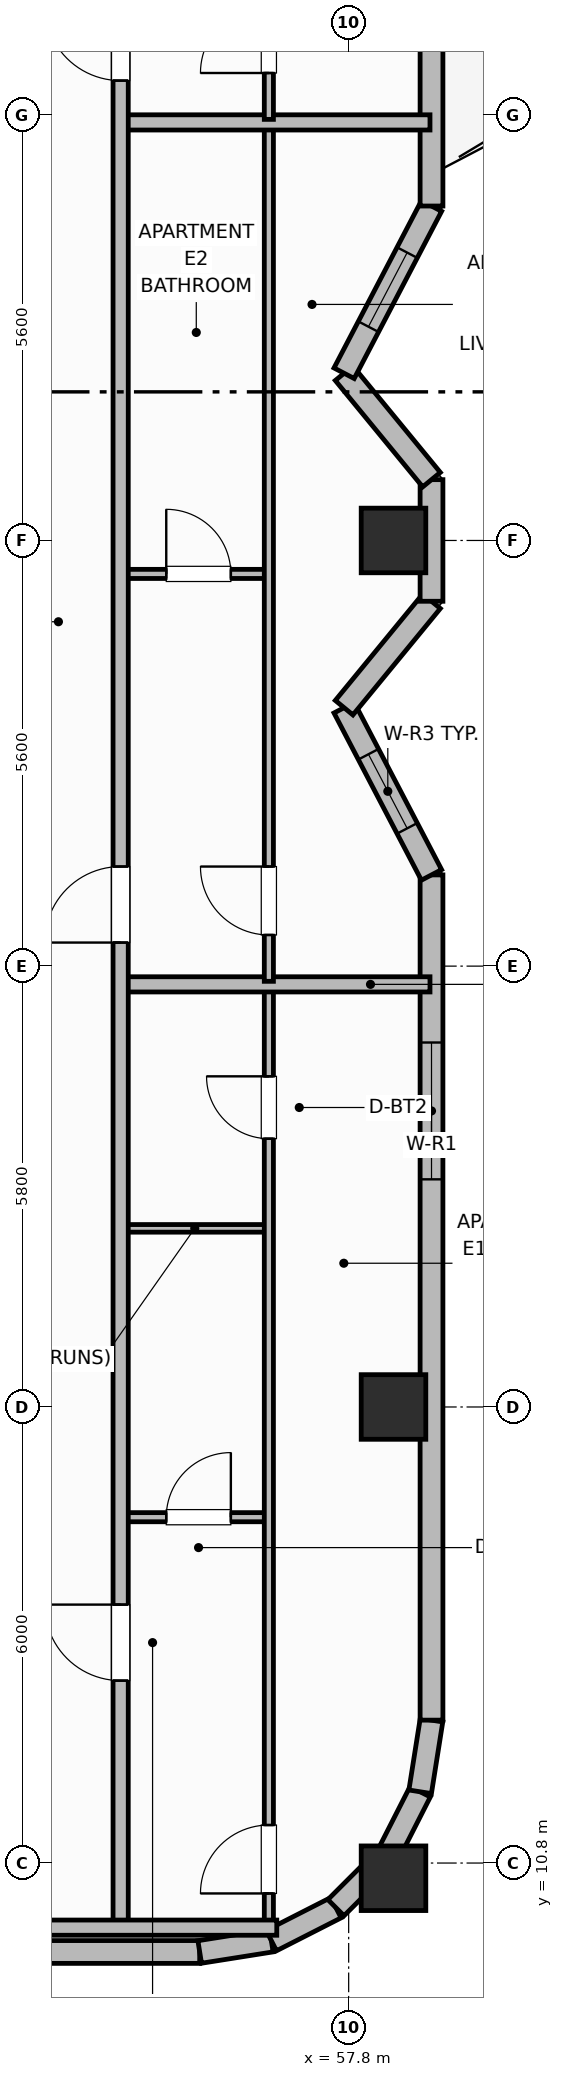
"""IFC4 building model, lengths in metres.
Left out: names, types, materials, properties, quantities, classifications, styles, units other than length and angle.
Written with IfcOpenShell. Run it as: python <this file> out.ifc"""

import sys

from ifc_helpers import new_model, si_unit, direction, frame, frame_2d, origin, origin_2d, place, context, subcontext, project, spatial, rectangle, extrude, element, fill, save


model = new_model("IFC4")
c1 = context("Model", 3, precision=1e-05, world=origin(), true_north=direction((0.0, 1.0)))
c2 = subcontext(c1, "Body", "Model", "MODEL_VIEW")
j1 = project(units=[si_unit("LENGTHUNIT", "METRE"), si_unit("PLANEANGLEUNIT", "RADIAN")], contexts=[c1])
p1 = place(None, origin())
s1 = spatial("IfcSite", under=j1, at=p1, CompositionType="ELEMENT")
p2 = place(p1, origin())
s2 = spatial("IfcBuilding", under=s1, at=p2, CompositionType="ELEMENT")
p3 = place(p2, frame((0.0, 0.0, 236.9)))
s3 = spatial("IfcBuildingStorey", under=s2, at=p3, CompositionType="ELEMENT", Elevation=236.9)
for number, where, z_axis, x_axis in (
    (1, (58.39, 10.6, 0.0), (0.0, 0.0, 1.0), (1.0, 0.0, 0.0)),
    (2, (58.39, 16.8, 0.0), (0.0, 0.0, 1.0), (1.0, 0.0, 0.0)),
    (3, (58.39, 28.2, 0.0), (0.0, 0.0, 1.0), (1.0, 0.0, 0.0)),
):
    element("IfcColumn", number, at=place(p3, frame(where, z_axis=z_axis, x_axis=x_axis)), inside=s3, PredefinedType="COLUMN", context=c2, shape_type="SweptSolid", body=[
        extrude(rectangle(XDim=0.85, YDim=0.85, at=origin_2d()), origin(), (0.0, 0.0, 1.0), 3.7),
    ])
p4 = place(p3, frame((30.61, 9.63, 0.0), z_axis=(0.0, 0.0, 1.0), x_axis=(1.0, 0.0, 0.0)))
e4 = element("IfcWall", 4, at=p4, inside=s3, PredefinedType="SOLIDWALL", context=c2, shape_type="SweptSolid", body=[
    extrude(rectangle(XDim=25.23, YDim=0.3, at=frame_2d((12.615, 0.0))), origin(), (0.0, 0.0, 1.0), 2.73),
])
p5 = place(p4, frame((0.894, 0.0, 0.71)))
e5 = element("IfcOpeningElement", 5, at=p5, cuts=e4, PredefinedType="OPENING", context=c2, shape_type="SweptSolid", body=[
    extrude(rectangle(XDim=2.1, YDim=1.9, at=frame_2d((1.05, 0.95))), frame((0.0, 0.16, 0.0), z_axis=(0.0, -1.0, 0.0), x_axis=(1.0, 0.0, 0.0)), (0.0, 0.0, 1.0), 0.32),
])
p6 = place(p4, frame((5.933, 0.0, 0.71)))
e6 = element("IfcOpeningElement", 6, at=p6, cuts=e4, PredefinedType="OPENING", context=c2, shape_type="SweptSolid", body=[
    extrude(rectangle(XDim=2.1, YDim=1.9, at=frame_2d((1.05, 0.95))), frame((0.0, 0.16, 0.0), z_axis=(0.0, -1.0, 0.0), x_axis=(1.0, 0.0, 0.0)), (0.0, 0.0, 1.0), 0.32),
])
p7 = place(p4, frame((9.221, 0.0, 0.71)))
e7 = element("IfcOpeningElement", 7, at=p7, cuts=e4, PredefinedType="OPENING", context=c2, shape_type="SweptSolid", body=[
    extrude(rectangle(XDim=2.1, YDim=1.9, at=frame_2d((1.05, 0.95))), frame((0.0, 0.16, 0.0), z_axis=(0.0, -1.0, 0.0), x_axis=(1.0, 0.0, 0.0)), (0.0, 0.0, 1.0), 0.32),
])
p8 = place(p4, frame((13.909, 0.0, 0.71)))
e8 = element("IfcOpeningElement", 8, at=p8, cuts=e4, PredefinedType="OPENING", context=c2, shape_type="SweptSolid", body=[
    extrude(rectangle(XDim=2.1, YDim=1.9, at=frame_2d((1.05, 0.95))), frame((0.0, 0.16, 0.0), z_axis=(0.0, -1.0, 0.0), x_axis=(1.0, 0.0, 0.0)), (0.0, 0.0, 1.0), 0.32),
])
p9 = place(p4, frame((17.548, 0.0, 0.71)))
e9 = element("IfcOpeningElement", 9, at=p9, cuts=e4, PredefinedType="OPENING", context=c2, shape_type="SweptSolid", body=[
    extrude(rectangle(XDim=2.1, YDim=1.9, at=frame_2d((1.05, 0.95))), frame((0.0, 0.16, 0.0), z_axis=(0.0, -1.0, 0.0), x_axis=(1.0, 0.0, 0.0)), (0.0, 0.0, 1.0), 0.32),
])
p10 = place(p3, frame((55.84, 9.63, 0.0), z_axis=(0.0, 0.0, 1.0), x_axis=(0.987663181641, 0.156593229835, 0.0)))
e10 = element("IfcWall", 10, at=p10, inside=s3, PredefinedType="SOLIDWALL", context=c2, shape_type="SweptSolid", body=[
    extrude(rectangle(XDim=0.954, YDim=0.3, at=frame_2d((0.477, 0.0))), origin(), (0.0, 0.0, 1.0), 2.73),
])
for number, where, z_axis, x_axis in (
    (11, (56.782, 9.779, 0.0), (0.0, 0.0, 1.0), (0.891, 0.454, 0.0)),
    (12, (57.633, 10.212, 0.0), (0.0, 0.0, 1.0), (0.707, 0.707, 0.0)),
    (13, (58.308, 10.887, 0.0), (0.0, 0.0, 1.0), (0.454, 0.891, 0.0)),
):
    element("IfcWall", number, at=place(p3, frame(where, z_axis=z_axis, x_axis=x_axis)), inside=s3, PredefinedType="SOLIDWALL", context=c2, shape_type="SweptSolid", body=[
        extrude(rectangle(XDim=0.954, YDim=0.3, at=frame_2d((0.477, 0.0))), origin(), (0.0, 0.0, 1.0), 2.73),
    ])
p11 = place(p3, frame((58.741, 11.738, 0.0), z_axis=(0.0, 0.0, 1.0), x_axis=(0.156343617883, 0.987702725088, 0.0)))
e14 = element("IfcWall", 14, at=p11, inside=s3, PredefinedType="SOLIDWALL", context=c2, shape_type="SweptSolid", body=[
    extrude(rectangle(XDim=0.954, YDim=0.3, at=frame_2d((0.477, 0.0))), origin(), (0.0, 0.0, 1.0), 2.73),
])
p12 = place(p3, frame((58.89, 12.68, 0.0), z_axis=(0.0, 0.0, 1.0), x_axis=(0.0, 1.0, 0.0)))
e15 = element("IfcWall", 15, at=p12, inside=s3, PredefinedType="SOLIDWALL", context=c2, shape_type="SweptSolid", body=[
    extrude(rectangle(XDim=11.12, YDim=0.3, at=frame_2d((5.56, 0.0))), origin(), (0.0, 0.0, 1.0), 2.73),
])
p13 = place(p12, frame((7.115, 0.0, 0.76)))
e16 = element("IfcOpeningElement", 16, at=p13, cuts=e15, PredefinedType="OPENING", context=c2, shape_type="SweptSolid", body=[
    extrude(rectangle(XDim=1.8, YDim=1.85, at=frame_2d((0.9, 0.925))), frame((0.0, 0.16, 0.0), z_axis=(0.0, -1.0, 0.0), x_axis=(1.0, 0.0, 0.0)), (0.0, 0.0, 1.0), 0.32),
])
p14 = place(p3, frame((58.89, 23.8, 0.0), z_axis=(0.0, 0.0, 1.0), x_axis=(-0.46323138706, 0.886237373418, 0.0)))
e17 = element("IfcWall", 17, at=p14, inside=s3, PredefinedType="SOLIDWALL", context=c2, shape_type="SweptSolid", body=[
    extrude(rectangle(XDim=2.482, YDim=0.3, at=frame_2d((1.241, 0.0))), origin(), (0.0, 0.0, 1.0), 2.73),
])
p15 = place(p14, frame((0.691, 0.0, 0.92)))
e18 = element("IfcOpeningElement", 18, at=p15, cuts=e17, PredefinedType="OPENING", context=c2, shape_type="SweptSolid", body=[
    extrude(rectangle(XDim=1.1, YDim=1.65, at=frame_2d((0.55, 0.825))), frame((0.0, 0.16, 0.0), z_axis=(0.0, -1.0, 0.0), x_axis=(1.0, 0.0, 0.0)), (0.0, 0.0, 1.0), 0.32),
])
p16 = place(p3, frame((57.74, 26.0, 0.0), z_axis=(0.0, 0.0, 1.0), x_axis=(0.634733675645, 0.772730975827, 0.0)))
e19 = element("IfcWall", 19, at=p16, inside=s3, PredefinedType="SOLIDWALL", context=c2, shape_type="SweptSolid", body=[
    extrude(rectangle(XDim=1.812, YDim=0.3, at=frame_2d((0.906, 0.0))), origin(), (0.0, 0.0, 1.0), 2.73),
])
p17 = place(p3, frame((58.89, 27.4, 0.0), z_axis=(0.0, 0.0, 1.0), x_axis=(0.0, 1.0, 0.0)))
e20 = element("IfcWall", 20, at=p17, inside=s3, PredefinedType="SOLIDWALL", context=c2, shape_type="SweptSolid", body=[
    extrude(rectangle(XDim=1.6, YDim=0.3, at=frame_2d((0.8, 0.0))), origin(), (0.0, 0.0, 1.0), 2.73),
])
p18 = place(p3, frame((58.89, 29.0, 0.0), z_axis=(0.0, 0.0, 1.0), x_axis=(-0.634733675645, 0.772730975827, 0.0)))
e21 = element("IfcWall", 21, at=p18, inside=s3, PredefinedType="SOLIDWALL", context=c2, shape_type="SweptSolid", body=[
    extrude(rectangle(XDim=1.812, YDim=0.3, at=frame_2d((0.906, 0.0))), origin(), (0.0, 0.0, 1.0), 2.73),
])
p19 = place(p3, frame((57.74, 30.4, 0.0), z_axis=(0.0, 0.0, 1.0), x_axis=(0.463191013929, 0.88625847506, 0.0)))
e22 = element("IfcWall", 22, at=p19, inside=s3, PredefinedType="SOLIDWALL", context=c2, shape_type="SweptSolid", body=[
    extrude(rectangle(XDim=2.483, YDim=0.3, at=frame_2d((1.241, 0.0))), origin(), (0.0, 0.0, 1.0), 2.73),
])
p20 = place(p19, frame((0.691, 0.0, 0.92)))
e23 = element("IfcOpeningElement", 23, at=p20, cuts=e22, PredefinedType="OPENING", context=c2, shape_type="SweptSolid", body=[
    extrude(rectangle(XDim=1.1, YDim=1.65, at=frame_2d((0.55, 0.825))), frame((0.0, 0.16, 0.0), z_axis=(0.0, -1.0, 0.0), x_axis=(1.0, 0.0, 0.0)), (0.0, 0.0, 1.0), 0.32),
])
p21 = place(p3, frame((58.89, 32.6, 0.0), z_axis=(0.0, 0.0, 1.0), x_axis=(0.0, 1.0, 0.0)))
e24 = element("IfcWall", 24, at=p21, inside=s3, PredefinedType="SOLIDWALL", context=c2, shape_type="SweptSolid", body=[
    extrude(rectangle(XDim=11.12, YDim=0.3, at=frame_2d((5.56, 0.0))), origin(), (0.0, 0.0, 1.0), 2.73),
])
p22 = place(p21, frame((2.1, 0.0, 0.0)))
e25 = element("IfcOpeningElement", 25, at=p22, cuts=e24, PredefinedType="OPENING", context=c2, shape_type="SweptSolid", body=[
    extrude(rectangle(XDim=1.6, YDim=2.1, at=frame_2d((0.8, 1.05))), frame((0.0, 0.16, 0.0), z_axis=(0.0, -1.0, 0.0), x_axis=(1.0, 0.0, 0.0)), (0.0, 0.0, 1.0), 0.32),
])
p23 = place(p21, frame((8.265, 0.0, 0.71)))
e26 = element("IfcOpeningElement", 26, at=p23, cuts=e24, PredefinedType="OPENING", context=c2, shape_type="SweptSolid", body=[
    extrude(rectangle(XDim=1.6, YDim=1.9, at=frame_2d((0.8, 0.95))), frame((0.0, 0.16, 0.0), z_axis=(0.0, -1.0, 0.0), x_axis=(1.0, 0.0, 0.0)), (0.0, 0.0, 1.0), 0.32),
])
p24 = place(p3, frame((54.8, 15.35, 0.0), z_axis=(0.0, 0.0, 1.0), x_axis=(1.0, 0.0, 0.0)))
e27 = element("IfcWall", 27, at=p24, inside=s3, PredefinedType="PARTITIONING", context=c2, shape_type="SweptSolid", body=[
    extrude(rectangle(XDim=1.95, YDim=0.12, at=frame_2d((0.975, 0.0))), origin(), (0.0, 0.0, 1.0), 2.56),
])
p25 = place(p24, frame((0.6, 0.0, 0.0)))
e28 = element("IfcOpeningElement", 28, at=p25, cuts=e27, PredefinedType="OPENING", context=c2, shape_type="SweptSolid", body=[
    extrude(rectangle(XDim=0.85, YDim=2.1, at=frame_2d((0.425, 1.05))), frame((0.0, 0.07, 0.0), z_axis=(0.0, -1.0, 0.0), x_axis=(1.0, 0.0, 0.0)), (0.0, 0.0, 1.0), 0.14),
])
p26 = place(p3, frame((54.8, 19.15, 0.0), z_axis=(0.0, 0.0, 1.0), x_axis=(1.0, 0.0, 0.0)))
e29 = element("IfcWall", 29, at=p26, inside=s3, PredefinedType="PARTITIONING", context=c2, shape_type="SweptSolid", body=[
    extrude(rectangle(XDim=1.95, YDim=0.1, at=frame_2d((0.975, 0.0))), origin(), (0.0, 0.0, 1.0), 2.56),
])
p27 = place(p3, frame((56.75, 9.99, 0.0), z_axis=(0.0, 0.0, 1.0), x_axis=(0.0, 1.0, 0.0)))
e30 = element("IfcWall", 30, at=p27, inside=s3, PredefinedType="PARTITIONING", context=c2, shape_type="SweptSolid", body=[
    extrude(rectangle(XDim=12.33, YDim=0.12, at=frame_2d((6.165, 0.0))), origin(), (0.0, 0.0, 1.0), 2.56),
])
p28 = place(p27, frame((0.41, 0.0, 0.0)))
e31 = element("IfcOpeningElement", 31, at=p28, cuts=e30, PredefinedType="OPENING", context=c2, shape_type="SweptSolid", body=[
    extrude(rectangle(XDim=0.9, YDim=2.1, at=frame_2d((0.45, 1.05))), frame((0.0, 0.07, 0.0), z_axis=(0.0, -1.0, 0.0), x_axis=(1.0, 0.0, 0.0)), (0.0, 0.0, 1.0), 0.14),
])
p29 = place(p27, frame((10.34, 0.0, 0.0)))
e32 = element("IfcOpeningElement", 32, at=p29, cuts=e30, PredefinedType="OPENING", context=c2, shape_type="SweptSolid", body=[
    extrude(rectangle(XDim=0.82, YDim=2.08, at=frame_2d((0.41, 1.04))), frame((0.0, 0.07, 0.0), z_axis=(0.0, -1.0, 0.0), x_axis=(1.0, 0.0, 0.0)), (0.0, 0.0, 1.0), 0.14),
])
p30 = place(p3, frame((54.8, 22.36, 0.0), z_axis=(0.0, 0.0, 1.0), x_axis=(1.0, 0.0, 0.0)))
e33 = element("IfcWall", 33, at=p30, inside=s3, PredefinedType="PARTITIONING", context=c2, shape_type="SweptSolid", body=[
    extrude(rectangle(XDim=4.07, YDim=0.2, at=frame_2d((2.035, 0.0))), origin(), (0.0, 0.0, 1.0), 2.56),
])
p31 = place(p3, frame((54.8, 27.76, 0.0), z_axis=(0.0, 0.0, 1.0), x_axis=(1.0, 0.0, 0.0)))
e34 = element("IfcWall", 34, at=p31, inside=s3, PredefinedType="PARTITIONING", context=c2, shape_type="SweptSolid", body=[
    extrude(rectangle(XDim=1.95, YDim=0.12, at=frame_2d((0.975, 0.0))), origin(), (0.0, 0.0, 1.0), 2.56),
])
p32 = place(p31, frame((0.6, 0.0, 0.0)))
e35 = element("IfcOpeningElement", 35, at=p32, cuts=e34, PredefinedType="OPENING", context=c2, shape_type="SweptSolid", body=[
    extrude(rectangle(XDim=0.85, YDim=2.1, at=frame_2d((0.425, 1.05))), frame((0.0, 0.07, 0.0), z_axis=(0.0, -1.0, 0.0), x_axis=(1.0, 0.0, 0.0)), (0.0, 0.0, 1.0), 0.14),
])
p33 = place(p3, frame((56.75, 22.4, 0.0), z_axis=(0.0, 0.0, 1.0), x_axis=(0.0, 1.0, 0.0)))
e36 = element("IfcWall", 36, at=p33, inside=s3, PredefinedType="PARTITIONING", context=c2, shape_type="SweptSolid", body=[
    extrude(rectangle(XDim=11.26, YDim=0.12, at=frame_2d((5.63, 0.0))), origin(), (0.0, 0.0, 1.0), 2.56),
])
p34 = place(p33, frame((0.61, 0.0, 0.0)))
e37 = element("IfcOpeningElement", 37, at=p34, cuts=e36, PredefinedType="OPENING", context=c2, shape_type="SweptSolid", body=[
    extrude(rectangle(XDim=0.9, YDim=2.1, at=frame_2d((0.45, 1.05))), frame((0.0, 0.07, 0.0), z_axis=(0.0, -1.0, 0.0), x_axis=(1.0, 0.0, 0.0)), (0.0, 0.0, 1.0), 0.14),
])
p35 = place(p3, frame((54.8, 33.7, 0.0), z_axis=(0.0, 0.0, 1.0), x_axis=(1.0, 0.0, 0.0)))
e38 = element("IfcWall", 38, at=p35, inside=s3, PredefinedType="PARTITIONING", context=c2, shape_type="SweptSolid", body=[
    extrude(rectangle(XDim=4.07, YDim=0.2, at=frame_2d((2.035, 0.0))), origin(), (0.0, 0.0, 1.0), 2.56),
])
p36 = place(p3, frame((56.75, 33.74, 0.0), z_axis=(0.0, 0.0, 1.0), x_axis=(0.0, 1.0, 0.0)))
e39 = element("IfcWall", 39, at=p36, inside=s3, PredefinedType="PARTITIONING", context=c2, shape_type="SweptSolid", body=[
    extrude(rectangle(XDim=12.67, YDim=0.12, at=frame_2d((6.335, 0.0))), origin(), (0.0, 0.0, 1.0), 2.56),
])
p37 = place(p36, frame((0.61, 0.0, 0.0)))
e40 = element("IfcOpeningElement", 40, at=p37, cuts=e39, PredefinedType="OPENING", context=c2, shape_type="SweptSolid", body=[
    extrude(rectangle(XDim=0.9, YDim=2.1, at=frame_2d((0.45, 1.05))), frame((0.0, 0.07, 0.0), z_axis=(0.0, -1.0, 0.0), x_axis=(1.0, 0.0, 0.0)), (0.0, 0.0, 1.0), 0.14),
])
p38 = place(p36, frame((10.51, 0.0, 0.0)))
e41 = element("IfcOpeningElement", 41, at=p38, cuts=e39, PredefinedType="OPENING", context=c2, shape_type="SweptSolid", body=[
    extrude(rectangle(XDim=0.82, YDim=2.08, at=frame_2d((0.41, 1.04))), frame((0.0, 0.07, 0.0), z_axis=(0.0, -1.0, 0.0), x_axis=(1.0, 0.0, 0.0)), (0.0, 0.0, 1.0), 0.14),
])
p39 = place(p3, frame((54.8, 9.95, 0.0), z_axis=(0.0, 0.0, 1.0), x_axis=(0.0, 1.0, 0.0)))
e42 = element("IfcWall", 42, at=p39, inside=s3, PredefinedType="PARTITIONING", context=c2, shape_type="SweptSolid", body=[
    extrude(rectangle(XDim=36.5, YDim=0.2, at=frame_2d((18.25, 0.0))), origin(), (0.0, 0.0, 1.0), 2.56),
])
p40 = place(p39, frame((3.25, 0.0, 0.0)))
e43 = element("IfcOpeningElement", 43, at=p40, cuts=e42, PredefinedType="OPENING", context=c2, shape_type="SweptSolid", body=[
    extrude(rectangle(XDim=1.0, YDim=2.15, at=frame_2d((0.5, 1.075))), frame((0.0, 0.11, 0.0), z_axis=(0.0, -1.0, 0.0), x_axis=(1.0, 0.0, 0.0)), (0.0, 0.0, 1.0), 0.22),
])
p41 = place(p39, frame((12.96, 0.0, 0.0)))
e44 = element("IfcOpeningElement", 44, at=p41, cuts=e42, PredefinedType="OPENING", context=c2, shape_type="SweptSolid", body=[
    extrude(rectangle(XDim=1.0, YDim=2.15, at=frame_2d((0.5, 1.075))), frame((0.0, 0.11, 0.0), z_axis=(0.0, -1.0, 0.0), x_axis=(1.0, 0.0, 0.0)), (0.0, 0.0, 1.0), 0.22),
])
p42 = place(p39, frame((24.3, 0.0, 0.0)))
e45 = element("IfcOpeningElement", 45, at=p42, cuts=e42, PredefinedType="OPENING", context=c2, shape_type="SweptSolid", body=[
    extrude(rectangle(XDim=1.0, YDim=2.15, at=frame_2d((0.5, 1.075))), frame((0.0, 0.11, 0.0), z_axis=(0.0, -1.0, 0.0), x_axis=(1.0, 0.0, 0.0)), (0.0, 0.0, 1.0), 0.22),
])
p43 = place(p3, frame((53.1, 9.95, 0.0), z_axis=(0.0, 0.0, 1.0), x_axis=(1.0, 0.0, 0.0)))
e46 = element("IfcWall", 46, at=p43, inside=s3, PredefinedType="PARTITIONING", context=c2, shape_type="SweptSolid", body=[
    extrude(rectangle(XDim=3.754, YDim=0.2, at=frame_2d((1.877, 0.0))), origin(), (0.0, 0.0, 1.0), 2.56),
])
p44 = place(p13, origin())
e47 = element("IfcWindow", 47, at=p44, inside=s3, PartitioningType="SINGLE_PANEL", PredefinedType="WINDOW", context=c2, shape_type="SweptSolid", body=[
    extrude(rectangle(XDim=1.8, YDim=1.85, at=frame_2d((0.9, 0.925))), frame((0.0, 0.03, 0.0), z_axis=(0.0, -1.0, 0.0), x_axis=(1.0, 0.0, 0.0)), (0.0, 0.0, 1.0), 0.06),
])
fill(e16, e47)
p45 = place(p15, origin())
e48 = element("IfcWindow", 48, at=p45, inside=s3, PartitioningType="SINGLE_PANEL", PredefinedType="WINDOW", context=c2, shape_type="SweptSolid", body=[
    extrude(rectangle(XDim=1.1, YDim=1.65, at=frame_2d((0.55, 0.825))), frame((0.0, 0.03, 0.0), z_axis=(0.0, -1.0, 0.0), x_axis=(1.0, 0.0, 0.0)), (0.0, 0.0, 1.0), 0.06),
])
fill(e18, e48)
p46 = place(p20, origin())
e49 = element("IfcWindow", 49, at=p46, inside=s3, PartitioningType="SINGLE_PANEL", PredefinedType="WINDOW", context=c2, shape_type="SweptSolid", body=[
    extrude(rectangle(XDim=1.1, YDim=1.65, at=frame_2d((0.55, 0.825))), frame((0.0, 0.03, 0.0), z_axis=(0.0, -1.0, 0.0), x_axis=(1.0, 0.0, 0.0)), (0.0, 0.0, 1.0), 0.06),
])
fill(e23, e49)
p47 = place(p25, origin())
e50 = element("IfcDoor", 50, at=p47, inside=s3, OperationType="SINGLE_SWING_RIGHT", PredefinedType="DOOR", context=c2, shape_type="SweptSolid", body=[
    extrude(rectangle(XDim=0.85, YDim=2.1, at=frame_2d((0.425, 1.05))), frame((0.0, 0.025, 0.0), z_axis=(0.0, -1.0, 0.0), x_axis=(1.0, 0.0, 0.0)), (0.0, 0.0, 1.0), 0.05),
])
fill(e28, e50)
p48 = place(p28, origin())
e51 = element("IfcDoor", 51, at=p48, inside=s3, OperationType="SINGLE_SWING_LEFT", PredefinedType="DOOR", context=c2, shape_type="SweptSolid", body=[
    extrude(rectangle(XDim=0.9, YDim=2.1, at=frame_2d((0.45, 1.05))), frame((0.0, 0.025, 0.0), z_axis=(0.0, -1.0, 0.0), x_axis=(1.0, 0.0, 0.0)), (0.0, 0.0, 1.0), 0.05),
])
fill(e31, e51)
p49 = place(p29, origin())
e52 = element("IfcDoor", 52, at=p49, inside=s3, OperationType="SINGLE_SWING_RIGHT", PredefinedType="DOOR", context=c2, shape_type="SweptSolid", body=[
    extrude(rectangle(XDim=0.82, YDim=2.08, at=frame_2d((0.41, 1.04))), frame((0.0, 0.025, 0.0), z_axis=(0.0, -1.0, 0.0), x_axis=(1.0, 0.0, 0.0)), (0.0, 0.0, 1.0), 0.05),
])
fill(e32, e52)
p50 = place(p32, origin())
e53 = element("IfcDoor", 53, at=p50, inside=s3, OperationType="SINGLE_SWING_LEFT", PredefinedType="DOOR", context=c2, shape_type="SweptSolid", body=[
    extrude(rectangle(XDim=0.85, YDim=2.1, at=frame_2d((0.425, 1.05))), frame((0.0, 0.025, 0.0), z_axis=(0.0, -1.0, 0.0), x_axis=(1.0, 0.0, 0.0)), (0.0, 0.0, 1.0), 0.05),
])
fill(e35, e53)
p51 = place(p34, origin())
e54 = element("IfcDoor", 54, at=p51, inside=s3, OperationType="SINGLE_SWING_RIGHT", PredefinedType="DOOR", context=c2, shape_type="SweptSolid", body=[
    extrude(rectangle(XDim=0.9, YDim=2.1, at=frame_2d((0.45, 1.05))), frame((0.0, 0.025, 0.0), z_axis=(0.0, -1.0, 0.0), x_axis=(1.0, 0.0, 0.0)), (0.0, 0.0, 1.0), 0.05),
])
fill(e37, e54)
p52 = place(p37, origin())
e55 = element("IfcDoor", 55, at=p52, inside=s3, OperationType="SINGLE_SWING_LEFT", PredefinedType="DOOR", context=c2, shape_type="SweptSolid", body=[
    extrude(rectangle(XDim=0.9, YDim=2.1, at=frame_2d((0.45, 1.05))), frame((0.0, 0.025, 0.0), z_axis=(0.0, -1.0, 0.0), x_axis=(1.0, 0.0, 0.0)), (0.0, 0.0, 1.0), 0.05),
])
fill(e40, e55)
p53 = place(p40, origin())
e56 = element("IfcDoor", 56, at=p53, inside=s3, OperationType="SINGLE_SWING_RIGHT", PredefinedType="DOOR", context=c2, shape_type="SweptSolid", body=[
    extrude(rectangle(XDim=1.0, YDim=2.15, at=frame_2d((0.5, 1.075))), frame((0.0, 0.025, 0.0), z_axis=(0.0, -1.0, 0.0), x_axis=(1.0, 0.0, 0.0)), (0.0, 0.0, 1.0), 0.05),
])
fill(e43, e56)
p54 = place(p41, origin())
e57 = element("IfcDoor", 57, at=p54, inside=s3, OperationType="SINGLE_SWING_LEFT", PredefinedType="DOOR", context=c2, shape_type="SweptSolid", body=[
    extrude(rectangle(XDim=1.0, YDim=2.15, at=frame_2d((0.5, 1.075))), frame((0.0, 0.025, 0.0), z_axis=(0.0, -1.0, 0.0), x_axis=(1.0, 0.0, 0.0)), (0.0, 0.0, 1.0), 0.05),
])
fill(e44, e57)
p55 = place(p42, origin())
e58 = element("IfcDoor", 58, at=p55, inside=s3, OperationType="SINGLE_SWING_RIGHT", PredefinedType="DOOR", context=c2, shape_type="SweptSolid", body=[
    extrude(rectangle(XDim=1.0, YDim=2.15, at=frame_2d((0.5, 1.075))), frame((0.0, 0.025, 0.0), z_axis=(0.0, -1.0, 0.0), x_axis=(1.0, 0.0, 0.0)), (0.0, 0.0, 1.0), 0.05),
])
fill(e45, e58)
save(model, sys.argv[1])
